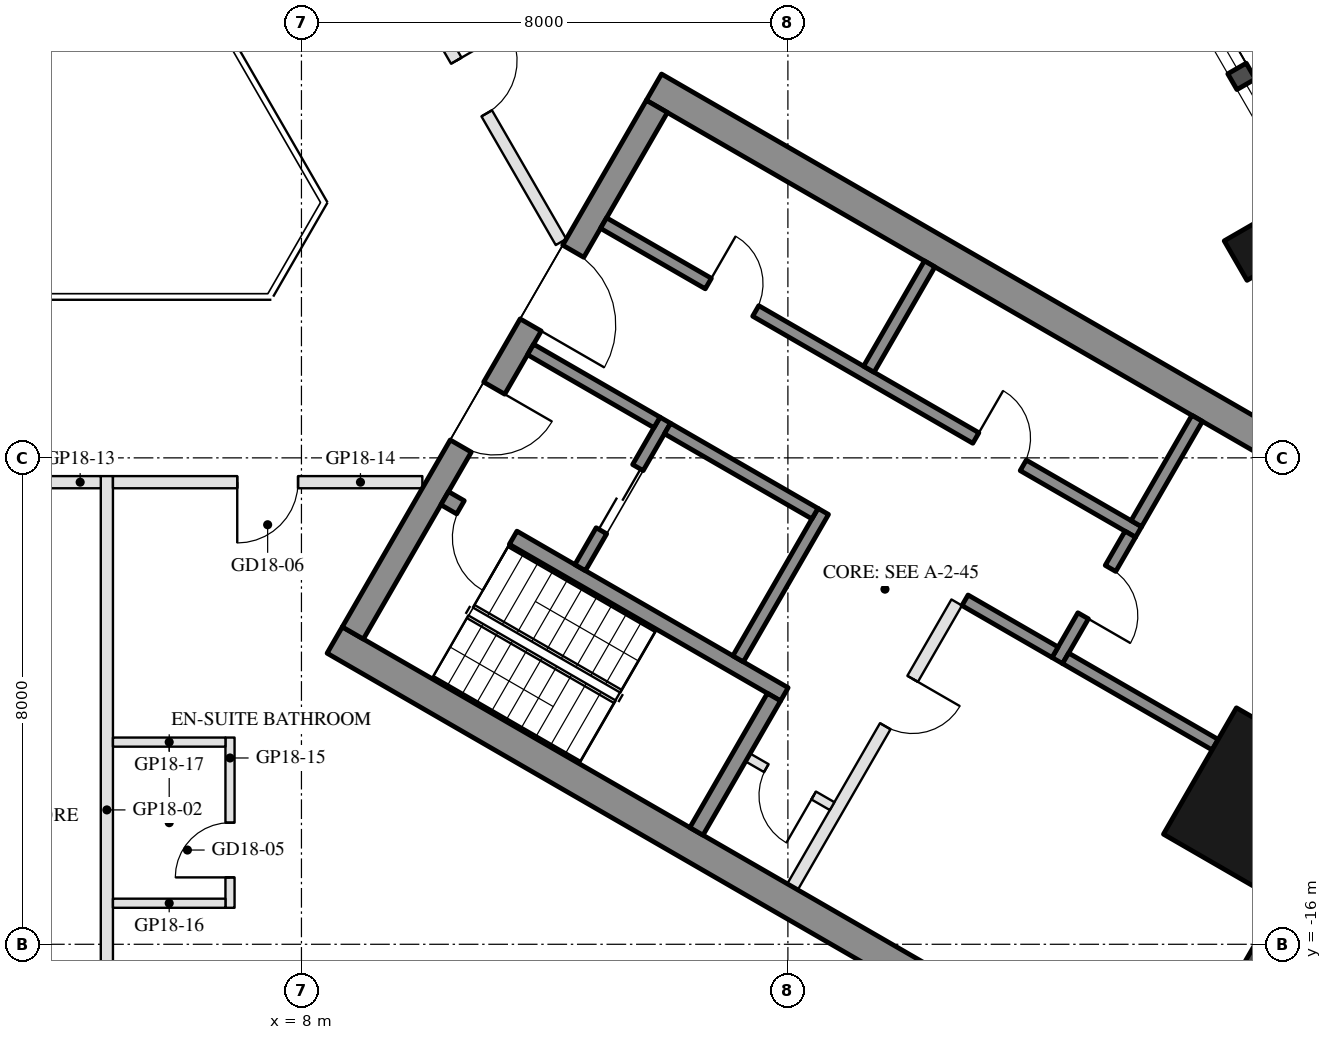
"""IFC4 building model, lengths in metres.
Left out: names, types, materials, properties, quantities, classifications, styles, units other than length and angle.
Written with IfcOpenShell. Run it as: python <this file> out.ifc"""

import sys

from ifc_helpers import new_model, si_unit, direction, frame, frame_2d, origin, origin_2d, place, context, subcontext, project, spatial, rectangle, hollow_rectangle, extrude, element, fill, save


model = new_model("IFC4")
c1 = context("Model", 3, precision=1e-05, world=origin(), true_north=direction((0.0, 1.0)))
c2 = subcontext(c1, "Body", "Model", "MODEL_VIEW")
j1 = project(units=[si_unit("LENGTHUNIT", "METRE"), si_unit("PLANEANGLEUNIT", "RADIAN")], contexts=[c1])
p1 = place(None, origin())
s1 = spatial("IfcSite", under=j1, at=p1, CompositionType="ELEMENT")
p2 = place(p1, origin())
s2 = spatial("IfcBuilding", under=s1, at=p2, CompositionType="ELEMENT")
p3 = place(p2, frame((0.0, 0.0, 198.4)))
s3 = spatial("IfcBuildingStorey", under=s2, at=p3, CompositionType="ELEMENT", Elevation=198.4)
p4 = place(p3, frame((23.688, -4.568, 0.0), z_axis=(0.0, 0.0, 1.0), x_axis=(-0.5, 0.866025403784, 0.0)))
e1 = element("IfcColumn", 1, at=p4, inside=s3, PredefinedType="COLUMN", context=c2, shape_type="SweptSolid", body=[
    extrude(hollow_rectangle(XDim=0.75, YDim=0.75, WallThickness=0.035, at=origin_2d()), origin(), (0.0, 0.0, 1.0), 3.7),
])
p5 = place(p3, frame((23.729, -13.7, 0.0), z_axis=(0.0, 0.0, 1.0), x_axis=(0.5, 0.866025403784, 0.0)))
e2 = element("IfcColumn", 2, at=p5, inside=s3, PredefinedType="COLUMN", context=c2, shape_type="SweptSolid", body=[
    extrude(hollow_rectangle(XDim=2.4, YDim=2.2, WallThickness=0.06, at=origin_2d()), origin(), (0.0, 0.0, 1.0), 3.7),
])
p6 = place(p3, frame((23.427, -16.792, 0.0), z_axis=(0.0, 0.0, 1.0), x_axis=(0.500018773155, 0.866014564827, 0.0)))
e3 = element("IfcWall", 3, at=p6, inside=s3, PredefinedType="SOLIDWALL", context=c2, shape_type="SweptSolid", body=[
    extrude(rectangle(XDim=5.658, YDim=0.35, at=frame_2d((2.829, 0.0))), origin(), (0.0, 0.0, 1.0), 3.55),
])
p7 = place(p3, frame((26.257, -6.567, 0.0), z_axis=(0.0, 0.0, 1.0), x_axis=(-0.500023526245, 0.866011820475, 0.0)))
e4 = element("IfcWall", 4, at=p7, inside=s3, PredefinedType="SOLIDWALL", context=c2, shape_type="SweptSolid", body=[
    extrude(rectangle(XDim=11.816, YDim=0.35, at=frame_2d((5.908, 0.0))), origin(), (0.0, 0.0, 1.0), 3.55),
])
p8 = place(p7, frame((0.38, 0.0, 0.3)))
e5 = element("IfcOpeningElement", 5, at=p8, cuts=e4, PredefinedType="OPENING", context=c2, shape_type="SweptSolid", body=[
    extrude(rectangle(XDim=1.9, YDim=2.65, at=frame_2d((0.95, 1.325))), frame((0.0, 0.185, 0.0), z_axis=(0.0, -1.0, 0.0), x_axis=(1.0, 0.0, 0.0)), (0.0, 0.0, 1.0), 0.37),
])
p9 = place(p7, frame((7.791, 0.0, 0.0)))
e6 = element("IfcOpeningElement", 6, at=p9, cuts=e4, PredefinedType="OPENING", context=c2, shape_type="SweptSolid", body=[
    extrude(rectangle(XDim=2.4, YDim=2.4, at=frame_2d((1.2, 1.2))), frame((0.0, 0.185, 0.0), z_axis=(0.0, -1.0, 0.0), x_axis=(1.0, 0.0, 0.0)), (0.0, 0.0, 1.0), 0.37),
])
p10 = place(p7, frame((3.741, 0.0, 0.3)))
e7 = element("IfcOpeningElement", 7, at=p10, cuts=e4, PredefinedType="OPENING", context=c2, shape_type="SweptSolid", body=[
    extrude(rectangle(XDim=1.7, YDim=2.65, at=frame_2d((0.85, 1.325))), frame((0.0, 0.185, 0.0), z_axis=(0.0, -1.0, 0.0), x_axis=(1.0, 0.0, 0.0)), (0.0, 0.0, 1.0), 0.37),
])
p11 = place(p7, frame((5.741, 0.0, 0.3)))
e8 = element("IfcOpeningElement", 8, at=p11, cuts=e4, PredefinedType="OPENING", context=c2, shape_type="SweptSolid", body=[
    extrude(rectangle(XDim=1.7, YDim=2.65, at=frame_2d((0.85, 1.325))), frame((0.0, 0.185, 0.0), z_axis=(0.0, -1.0, 0.0), x_axis=(1.0, 0.0, 0.0)), (0.0, 0.0, 1.0), 0.37),
])
for number, where, z_axis, x_axis in (
    (9, (8.547, -10.997, 0.0), (0.0, 0.0, 1.0), (0.866, -0.5, 0.0)),
    (10, (13.797, -1.903, 0.0), (0.0, 0.0, 1.0), (0.866, -0.5, 0.0)),
):
    element("IfcWall", number, at=place(p3, frame(where, z_axis=z_axis, x_axis=x_axis)), inside=s3, PredefinedType="SHEAR", context=c2, shape_type="SweptSolid", body=[
        extrude(rectangle(XDim=14.837, YDim=0.5, at=frame_2d((7.418, 0.0))), origin(), (0.0, 0.0, 1.0), 3.5),
    ])
p12 = place(p3, frame((8.845, -10.88, 0.0), z_axis=(0.0, 0.0, 1.0), x_axis=(0.500004234368, 0.866022959057, 0.0)))
e11 = element("IfcWall", 11, at=p12, inside=s3, PredefinedType="SHEAR", context=c2, shape_type="SweptSolid", body=[
    extrude(rectangle(XDim=10.0, YDim=0.4, at=frame_2d((5.0, 0.0))), origin(), (0.0, 0.0, 1.0), 3.5),
])
p13 = place(p12, frame((3.55, 0.0, 0.0)))
e12 = element("IfcOpeningElement", 12, at=p13, cuts=e11, PredefinedType="OPENING", context=c2, shape_type="SweptSolid", body=[
    extrude(rectangle(XDim=1.1, YDim=2.1, at=frame_2d((0.55, 1.05))), frame((0.0, 0.21, 0.0), z_axis=(0.0, -1.0, 0.0), x_axis=(1.0, 0.0, 0.0)), (0.0, 0.0, 1.0), 0.42),
])
p14 = place(p12, frame((5.85, 0.0, 0.0)))
e13 = element("IfcOpeningElement", 13, at=p14, cuts=e11, PredefinedType="OPENING", context=c2, shape_type="SweptSolid", body=[
    extrude(rectangle(XDim=1.4, YDim=2.1, at=frame_2d((0.7, 1.05))), frame((0.0, 0.21, 0.0), z_axis=(0.0, -1.0, 0.0), x_axis=(1.0, 0.0, 0.0)), (0.0, 0.0, 1.0), 0.42),
])
p15 = place(p3, frame((10.356, -8.664, 0.0), z_axis=(0.0, 0.0, 1.0), x_axis=(0.866028629588, -0.499994412703, 0.0)))
e14 = element("IfcWall", 14, at=p15, inside=s3, PredefinedType="SHEAR", context=c2, shape_type="SweptSolid", body=[
    extrude(rectangle(XDim=6.45, YDim=0.25, at=frame_2d((3.225, 0.0))), origin(), (0.0, 0.0, 1.0), 3.5),
])
p16 = place(p15, frame((0.3, 0.0, 0.0)))
e15 = element("IfcOpeningElement", 15, at=p16, cuts=e14, PredefinedType="OPENING", context=c2, shape_type="SweptSolid", body=[
    extrude(rectangle(XDim=1.0, YDim=2.1, at=frame_2d((0.5, 1.05))), frame((0.0, 0.135, 0.0), z_axis=(0.0, -1.0, 0.0), x_axis=(1.0, 0.0, 0.0)), (0.0, 0.0, 1.0), 0.27),
])
p17 = place(p3, frame((14.496, -14.143, 0.0), z_axis=(0.0, 0.0, 1.0), x_axis=(0.500062241894, 0.865989465428, 0.0)))
e16 = element("IfcWall", 16, at=p17, inside=s3, PredefinedType="SHEAR", context=c2, shape_type="SweptSolid", body=[
    extrude(rectangle(XDim=2.55, YDim=0.25, at=frame_2d((1.275, 0.0))), origin(), (0.0, 0.0, 1.0), 3.5),
])
p18 = place(p3, frame((15.181, -11.305, 0.0), z_axis=(0.0, 0.0, 1.0), x_axis=(0.49994636267, 0.866056369097, 0.0)))
e17 = element("IfcWall", 17, at=p18, inside=s3, PredefinedType="SHEAR", context=c2, shape_type="SweptSolid", body=[
    extrude(rectangle(XDim=2.8, YDim=0.2, at=frame_2d((1.4, 0.0))), origin(), (0.0, 0.0, 1.0), 3.5),
])
p19 = place(p3, frame((12.583, -9.805, 0.0), z_axis=(0.0, 0.0, 1.0), x_axis=(0.49994636267, 0.866056369097, 0.0)))
e18 = element("IfcWall", 18, at=p19, inside=s3, PredefinedType="SHEAR", context=c2, shape_type="SweptSolid", body=[
    extrude(rectangle(XDim=2.8, YDim=0.2, at=frame_2d((1.4, 0.0))), origin(), (0.0, 0.0, 1.0), 3.5),
])
p20 = place(p19, frame((0.7, 0.0, 0.0)))
e19 = element("IfcOpeningElement", 19, at=p20, cuts=e18, PredefinedType="OPENING", context=c2, shape_type="SweptSolid", body=[
    extrude(rectangle(XDim=1.2, YDim=2.1, at=frame_2d((0.6, 1.05))), frame((0.0, 0.11, 0.0), z_axis=(0.0, -1.0, 0.0), x_axis=(1.0, 0.0, 0.0)), (0.0, 0.0, 1.0), 0.22),
])
p21 = place(p3, frame((11.768, -6.217, 0.0), z_axis=(0.0, 0.0, 1.0), x_axis=(0.866050077142, -0.499957262057, 0.0)))
e20 = element("IfcWall", 20, at=p21, inside=s3, PredefinedType="SHEAR", context=c2, shape_type="SweptSolid", body=[
    extrude(rectangle(XDim=2.4, YDim=0.2, at=frame_2d((1.2, 0.0))), origin(), (0.0, 0.0, 1.0), 3.5),
])
p22 = place(p3, frame((14.02, -7.517, 0.0), z_axis=(0.0, 0.0, 1.0), x_axis=(0.866034573852, -0.49998411664, 0.0)))
e21 = element("IfcWall", 21, at=p22, inside=s3, PredefinedType="SHEAR", context=c2, shape_type="SweptSolid", body=[
    extrude(rectangle(XDim=2.8, YDim=0.2, at=frame_2d((1.4, 0.0))), origin(), (0.0, 0.0, 1.0), 3.5),
])
p23 = place(p3, frame((12.968, -4.138, 0.0), z_axis=(0.0, 0.0, 1.0), x_axis=(0.866028328073, -0.49999493495, 0.0)))
e22 = element("IfcWall", 22, at=p23, inside=s3, PredefinedType="SHEAR", context=c2, shape_type="SweptSolid", body=[
    extrude(rectangle(XDim=10.16, YDim=0.2, at=frame_2d((5.08, 0.0))), origin(), (0.0, 0.0, 1.0), 3.5),
])
p24 = place(p23, frame((1.99, 0.0, 0.0)))
e23 = element("IfcOpeningElement", 23, at=p24, cuts=e22, PredefinedType="OPENING", context=c2, shape_type="SweptSolid", body=[
    extrude(rectangle(XDim=0.9, YDim=2.1, at=frame_2d((0.45, 1.05))), frame((0.0, 0.11, 0.0), z_axis=(0.0, -1.0, 0.0), x_axis=(1.0, 0.0, 0.0)), (0.0, 0.0, 1.0), 0.22),
])
p25 = place(p23, frame((7.07, 0.0, 0.0)))
e24 = element("IfcOpeningElement", 24, at=p25, cuts=e22, PredefinedType="OPENING", context=c2, shape_type="SweptSolid", body=[
    extrude(rectangle(XDim=0.9, YDim=2.1, at=frame_2d((0.45, 1.05))), frame((0.0, 0.11, 0.0), z_axis=(0.0, -1.0, 0.0), x_axis=(1.0, 0.0, 0.0)), (0.0, 0.0, 1.0), 0.22),
])
p26 = place(p3, frame((20.43, -11.333, 0.0), z_axis=(0.0, 0.0, 1.0), x_axis=(0.500001309137, 0.866024647952, 0.0)))
e25 = element("IfcWall", 25, at=p26, inside=s3, PredefinedType="SHEAR", context=c2, shape_type="SweptSolid", body=[
    extrude(rectangle(XDim=2.4, YDim=0.2, at=frame_2d((1.2, 0.0))), origin(), (0.0, 0.0, 1.0), 3.5),
])
p27 = place(p26, frame((0.85, 0.0, 0.0)))
e26 = element("IfcOpeningElement", 26, at=p27, cuts=e25, PredefinedType="OPENING", context=c2, shape_type="SweptSolid", body=[
    extrude(rectangle(XDim=0.9, YDim=2.1, at=frame_2d((0.45, 1.05))), frame((0.0, 0.11, 0.0), z_axis=(0.0, -1.0, 0.0), x_axis=(1.0, 0.0, 0.0)), (0.0, 0.0, 1.0), 0.22),
])
p28 = place(p3, frame((18.913, -10.342, 0.0), z_axis=(0.0, 0.0, 1.0), x_axis=(0.866038183914, -0.499977863513, 0.0)))
e27 = element("IfcWall", 27, at=p28, inside=s3, PredefinedType="SHEAR", context=c2, shape_type="SweptSolid", body=[
    extrude(rectangle(XDim=1.71, YDim=0.2, at=frame_2d((0.855, 0.0))), origin(), (0.0, 0.0, 1.0), 3.5),
])
for number, where, z_axis, x_axis in (
    (28, (17.331, -6.542, 0.0), (0.0, 0.0, 1.0), (0.5, 0.866, 0.0)),
    (29, (21.73, -9.082, 0.0), (0.0, 0.0, 1.0), (0.5, 0.866, 0.0)),
):
    element("IfcWall", number, at=place(p3, frame(where, z_axis=z_axis, x_axis=x_axis)), inside=s3, PredefinedType="SHEAR", context=c2, shape_type="SweptSolid", body=[
        extrude(rectangle(XDim=2.0, YDim=0.2, at=frame_2d((1.0, 0.0))), origin(), (0.0, 0.0, 1.0), 3.5),
    ])
p29 = place(p3, frame((20.567, -11.297, 0.0), z_axis=(0.0, 0.0, 1.0), x_axis=(0.866055327414, -0.49994816717, 0.0)))
e30 = element("IfcWall", 30, at=p29, inside=s3, PredefinedType="SHEAR", context=c2, shape_type="SweptSolid", body=[
    extrude(rectangle(XDim=2.84, YDim=0.2, at=frame_2d((1.42, 0.0))), origin(), (0.0, 0.0, 1.0), 3.5),
])
p30 = place(p3, frame((16.076, -15.055, 0.0), z_axis=(0.0, 0.0, 1.0), x_axis=(0.499995103361, 0.866028230842, 0.0)))
e31 = element("IfcWall", 31, at=p30, inside=s3, PredefinedType="PARTITIONING", context=c2, shape_type="SweptSolid", body=[
    extrude(rectangle(XDim=5.4, YDim=0.2, at=frame_2d((2.7, 0.0))), origin(), (0.0, 0.0, 1.0), 3.5),
])
p31 = place(p30, frame((3.05, 0.0, 0.0)))
e32 = element("IfcOpeningElement", 32, at=p31, cuts=e31, PredefinedType="OPENING", context=c2, shape_type="SweptSolid", body=[
    extrude(rectangle(XDim=0.9, YDim=2.1, at=frame_2d((0.45, 1.05))), frame((0.0, 0.11, 0.0), z_axis=(0.0, -1.0, 0.0), x_axis=(1.0, 0.0, 0.0)), (0.0, 0.0, 1.0), 0.22),
])
p32 = place(p3, frame((15.342, -12.928, 0.0), z_axis=(0.0, 0.0, 1.0), x_axis=(0.865989903783, -0.500061482766, 0.0)))
e33 = element("IfcWall", 33, at=p32, inside=s3, PredefinedType="PARTITIONING", context=c2, shape_type="SweptSolid", body=[
    extrude(rectangle(XDim=1.6, YDim=0.15, at=frame_2d((0.8, 0.0))), origin(), (0.0, 0.0, 1.0), 3.5),
])
p33 = place(p32, frame((0.35, 0.0, 0.0)))
e34 = element("IfcOpeningElement", 34, at=p33, cuts=e33, PredefinedType="OPENING", context=c2, shape_type="SweptSolid", body=[
    extrude(rectangle(XDim=0.9, YDim=2.1, at=frame_2d((0.45, 1.05))), frame((0.0, 0.085, 0.0), z_axis=(0.0, -1.0, 0.0), x_axis=(1.0, 0.0, 0.0)), (0.0, 0.0, 1.0), 0.17),
])
p34 = place(p3, frame((4.8, -19.28, 0.0), z_axis=(0.0, 0.0, 1.0), x_axis=(0.0, 1.0, 0.0)))
e35 = element("IfcWall", 35, at=p34, inside=s3, PredefinedType="PARTITIONING", context=c2, shape_type="SweptSolid", body=[
    extrude(rectangle(XDim=10.98, YDim=0.2, at=frame_2d((5.49, 0.0))), origin(), (0.0, 0.0, 1.0), 3.06),
])
p35 = place(p3, frame((4.7, -8.4, 0.0), z_axis=(0.0, 0.0, 1.0), x_axis=(-1.0, 0.0, 0.0)))
e36 = element("IfcWall", 36, at=p35, inside=s3, PredefinedType="PARTITIONING", context=c2, shape_type="SweptSolid", body=[
    extrude(rectangle(XDim=2.826, YDim=0.2, at=frame_2d((1.413, 0.0))), origin(), (0.0, 0.0, 1.0), 2.95),
])
p36 = place(p35, frame((0.963, 0.0, 0.0)))
e37 = element("IfcOpeningElement", 37, at=p36, cuts=e36, PredefinedType="OPENING", context=c2, shape_type="SweptSolid", body=[
    extrude(rectangle(XDim=0.9, YDim=2.1, at=frame_2d((0.45, 1.05))), frame((0.0, 0.11, 0.0), z_axis=(0.0, -1.0, 0.0), x_axis=(1.0, 0.0, 0.0)), (0.0, 0.0, 1.0), 0.22),
])
p37 = place(p3, frame((9.988, -8.4, 0.0), z_axis=(0.0, 0.0, 1.0), x_axis=(-1.0, 0.0, 0.0)))
e38 = element("IfcWall", 38, at=p37, inside=s3, PredefinedType="PARTITIONING", context=c2, shape_type="SweptSolid", body=[
    extrude(rectangle(XDim=5.088, YDim=0.2, at=frame_2d((2.544, 0.0))), origin(), (0.0, 0.0, 1.0), 2.95),
])
p38 = place(p37, frame((2.044, 0.0, 0.0)))
e39 = element("IfcOpeningElement", 39, at=p38, cuts=e38, PredefinedType="OPENING", context=c2, shape_type="SweptSolid", body=[
    extrude(rectangle(XDim=1.0, YDim=2.1, at=frame_2d((0.5, 1.05))), frame((0.0, 0.11, 0.0), z_axis=(0.0, -1.0, 0.0), x_axis=(1.0, 0.0, 0.0)), (0.0, 0.0, 1.0), 0.22),
])
p39 = place(p3, frame((6.825, -15.4, 0.0), z_axis=(0.0, 0.0, 1.0), x_axis=(0.0, 1.0, 0.0)))
e40 = element("IfcWall", 40, at=p39, inside=s3, PredefinedType="PARTITIONING", context=c2, shape_type="SweptSolid", body=[
    extrude(rectangle(XDim=2.8, YDim=0.15, at=frame_2d((1.4, 0.0))), origin(), (0.0, 0.0, 1.0), 3.55),
])
p40 = place(p39, frame((0.5, 0.0, 0.0)))
e41 = element("IfcOpeningElement", 41, at=p40, cuts=e40, PredefinedType="OPENING", context=c2, shape_type="SweptSolid", body=[
    extrude(rectangle(XDim=0.9, YDim=2.1, at=frame_2d((0.45, 1.05))), frame((0.0, 0.085, 0.0), z_axis=(0.0, -1.0, 0.0), x_axis=(1.0, 0.0, 0.0)), (0.0, 0.0, 1.0), 0.17),
])
for number, where, z_axis, x_axis in (
    (42, (4.9, -15.325, 0.0), (0.0, 0.0, 1.0), (1.0, 0.0, 0.0)),
    (43, (4.9, -12.675, 0.0), (0.0, 0.0, 1.0), (1.0, 0.0, 0.0)),
):
    element("IfcWall", number, at=place(p3, frame(where, z_axis=z_axis, x_axis=x_axis)), inside=s3, PredefinedType="PARTITIONING", context=c2, shape_type="SweptSolid", body=[
        extrude(rectangle(XDim=1.85, YDim=0.15, at=frame_2d((0.925, 0.0))), origin(), (0.0, 0.0, 1.0), 3.55),
    ])
p41 = place(p3, frame((9.325, 0.649, 0.0), z_axis=(0.0, 0.0, 1.0), x_axis=(0.500032331163, -0.866006736574, 0.0)))
e44 = element("IfcWall", 44, at=p41, inside=s3, PredefinedType="PARTITIONING", context=c2, shape_type="SweptSolid", body=[
    extrude(rectangle(XDim=5.888, YDim=0.2, at=frame_2d((2.944, 0.0))), origin(), (0.0, 0.0, 1.0), 2.95),
])
p42 = place(p41, frame((2.444, 0.0, 0.0)))
e45 = element("IfcOpeningElement", 45, at=p42, cuts=e44, PredefinedType="OPENING", context=c2, shape_type="SweptSolid", body=[
    extrude(rectangle(XDim=1.0, YDim=2.1, at=frame_2d((0.5, 1.05))), frame((0.0, 0.11, 0.0), z_axis=(0.0, -1.0, 0.0), x_axis=(1.0, 0.0, 0.0)), (0.0, 0.0, 1.0), 0.22),
])
p43 = place(p10, origin())
e46 = element("IfcWindow", 46, at=p43, inside=s3, PartitioningType="SINGLE_PANEL", PredefinedType="WINDOW", context=c2, shape_type="SweptSolid", body=[
    extrude(rectangle(XDim=1.7, YDim=2.65, at=frame_2d((0.85, 1.325))), frame((0.0, 0.03, 0.0), z_axis=(0.0, -1.0, 0.0), x_axis=(1.0, 0.0, 0.0)), (0.0, 0.0, 1.0), 0.06),
])
fill(e7, e46)
p44 = place(p11, origin())
e47 = element("IfcWindow", 47, at=p44, inside=s3, PartitioningType="SINGLE_PANEL", PredefinedType="WINDOW", context=c2, shape_type="SweptSolid", body=[
    extrude(rectangle(XDim=1.7, YDim=2.65, at=frame_2d((0.85, 1.325))), frame((0.0, 0.03, 0.0), z_axis=(0.0, -1.0, 0.0), x_axis=(1.0, 0.0, 0.0)), (0.0, 0.0, 1.0), 0.06),
])
fill(e8, e47)
p45 = place(p20, origin())
e48 = element("IfcDoor", 48, at=p45, inside=s3, OperationType="DOUBLE_DOOR_SLIDING", PredefinedType="DOOR", context=c2, shape_type="SweptSolid", body=[
    extrude(rectangle(XDim=1.2, YDim=2.1, at=frame_2d((0.6, 1.05))), frame((0.0, 0.025, 0.0), z_axis=(0.0, -1.0, 0.0), x_axis=(1.0, 0.0, 0.0)), (0.0, 0.0, 1.0), 0.05),
])
fill(e19, e48)
p46 = place(p33, frame((0.9, 0.0, 0.0), z_axis=(0.0, 0.0, 1.0), x_axis=(-1.0, 0.0, 0.0)))
e49 = element("IfcDoor", 49, at=p46, inside=s3, OperationType="SINGLE_SWING_LEFT", PredefinedType="DOOR", context=c2, shape_type="SweptSolid", body=[
    extrude(rectangle(XDim=0.9, YDim=2.1, at=frame_2d((0.45, 1.05))), frame((0.0, 0.025, 0.0), z_axis=(0.0, -1.0, 0.0), x_axis=(1.0, 0.0, 0.0)), (0.0, 0.0, 1.0), 0.05),
])
fill(e34, e49)
p47 = place(p24, origin())
e50 = element("IfcDoor", 50, at=p47, inside=s3, OperationType="SINGLE_SWING_LEFT", PredefinedType="DOOR", context=c2, shape_type="SweptSolid", body=[
    extrude(rectangle(XDim=0.9, YDim=2.1, at=frame_2d((0.45, 1.05))), frame((0.0, 0.025, 0.0), z_axis=(0.0, -1.0, 0.0), x_axis=(1.0, 0.0, 0.0)), (0.0, 0.0, 1.0), 0.05),
])
fill(e23, e50)
p48 = place(p25, origin())
e51 = element("IfcDoor", 51, at=p48, inside=s3, OperationType="SINGLE_SWING_LEFT", PredefinedType="DOOR", context=c2, shape_type="SweptSolid", body=[
    extrude(rectangle(XDim=0.9, YDim=2.1, at=frame_2d((0.45, 1.05))), frame((0.0, 0.025, 0.0), z_axis=(0.0, -1.0, 0.0), x_axis=(1.0, 0.0, 0.0)), (0.0, 0.0, 1.0), 0.05),
])
fill(e24, e51)
p49 = place(p27, frame((0.9, 0.0, 0.0), z_axis=(0.0, 0.0, 1.0), x_axis=(-1.0, 0.0, 0.0)))
e52 = element("IfcDoor", 52, at=p49, inside=s3, OperationType="SINGLE_SWING_RIGHT", PredefinedType="DOOR", context=c2, shape_type="SweptSolid", body=[
    extrude(rectangle(XDim=0.9, YDim=2.1, at=frame_2d((0.45, 1.05))), frame((0.0, 0.025, 0.0), z_axis=(0.0, -1.0, 0.0), x_axis=(1.0, 0.0, 0.0)), (0.0, 0.0, 1.0), 0.05),
])
fill(e26, e52)
p50 = place(p31, frame((0.9, 0.0, 0.0), z_axis=(0.0, 0.0, 1.0), x_axis=(-1.0, 0.0, 0.0)))
e53 = element("IfcDoor", 53, at=p50, inside=s3, OperationType="SINGLE_SWING_LEFT", PredefinedType="DOOR", context=c2, shape_type="SweptSolid", body=[
    extrude(rectangle(XDim=0.9, YDim=2.1, at=frame_2d((0.45, 1.05))), frame((0.0, 0.025, 0.0), z_axis=(0.0, -1.0, 0.0), x_axis=(1.0, 0.0, 0.0)), (0.0, 0.0, 1.0), 0.05),
])
fill(e32, e53)
p51 = place(p13, frame((1.1, 0.0, 0.0), z_axis=(0.0, 0.0, 1.0), x_axis=(-1.0, 0.0, 0.0)))
e54 = element("IfcDoor", 54, at=p51, inside=s3, OperationType="SINGLE_SWING_LEFT", PredefinedType="DOOR", context=c2, shape_type="SweptSolid", body=[
    extrude(rectangle(XDim=1.1, YDim=2.1, at=frame_2d((0.55, 1.05))), frame((0.0, 0.025, 0.0), z_axis=(0.0, -1.0, 0.0), x_axis=(1.0, 0.0, 0.0)), (0.0, 0.0, 1.0), 0.05),
])
fill(e12, e54)
p52 = place(p14, frame((1.4, 0.0, 0.0), z_axis=(0.0, 0.0, 1.0), x_axis=(-1.0, 0.0, 0.0)))
e55 = element("IfcDoor", 55, at=p52, inside=s3, OperationType="DOUBLE_DOOR_SINGLE_SWING", PredefinedType="DOOR", context=c2, shape_type="SweptSolid", body=[
    extrude(rectangle(XDim=1.4, YDim=2.1, at=frame_2d((0.7, 1.05))), frame((0.0, 0.025, 0.0), z_axis=(0.0, -1.0, 0.0), x_axis=(1.0, 0.0, 0.0)), (0.0, 0.0, 1.0), 0.05),
])
fill(e13, e55)
p53 = place(p16, frame((1.0, 0.0, 0.0), z_axis=(0.0, 0.0, 1.0), x_axis=(-1.0, 0.0, 0.0)))
e56 = element("IfcDoor", 56, at=p53, inside=s3, OperationType="SINGLE_SWING_LEFT", PredefinedType="DOOR", context=c2, shape_type="SweptSolid", body=[
    extrude(rectangle(XDim=1.0, YDim=2.1, at=frame_2d((0.5, 1.05))), frame((0.0, 0.025, 0.0), z_axis=(0.0, -1.0, 0.0), x_axis=(1.0, 0.0, 0.0)), (0.0, 0.0, 1.0), 0.05),
])
fill(e15, e56)
p54 = place(p40, origin())
e57 = element("IfcDoor", 57, at=p54, inside=s3, OperationType="SINGLE_SWING_LEFT", PredefinedType="DOOR", context=c2, shape_type="SweptSolid", body=[
    extrude(rectangle(XDim=0.9, YDim=2.1, at=frame_2d((0.45, 1.05))), frame((0.0, 0.025, 0.0), z_axis=(0.0, -1.0, 0.0), x_axis=(1.0, 0.0, 0.0)), (0.0, 0.0, 1.0), 0.05),
])
fill(e41, e57)
p55 = place(p38, origin())
e58 = element("IfcDoor", 58, at=p55, inside=s3, OperationType="SINGLE_SWING_RIGHT", PredefinedType="DOOR", context=c2, shape_type="SweptSolid", body=[
    extrude(rectangle(XDim=1.0, YDim=2.1, at=frame_2d((0.5, 1.05))), frame((0.0, 0.025, 0.0), z_axis=(0.0, -1.0, 0.0), x_axis=(1.0, 0.0, 0.0)), (0.0, 0.0, 1.0), 0.05),
])
fill(e39, e58)
p56 = place(p42, origin())
e59 = element("IfcDoor", 59, at=p56, inside=s3, OperationType="SINGLE_SWING_LEFT", PredefinedType="DOOR", context=c2, shape_type="SweptSolid", body=[
    extrude(rectangle(XDim=1.0, YDim=2.1, at=frame_2d((0.5, 1.05))), frame((0.0, 0.025, 0.0), z_axis=(0.0, -1.0, 0.0), x_axis=(1.0, 0.0, 0.0)), (0.0, 0.0, 1.0), 0.05),
])
fill(e45, e59)
save(model, sys.argv[1])
